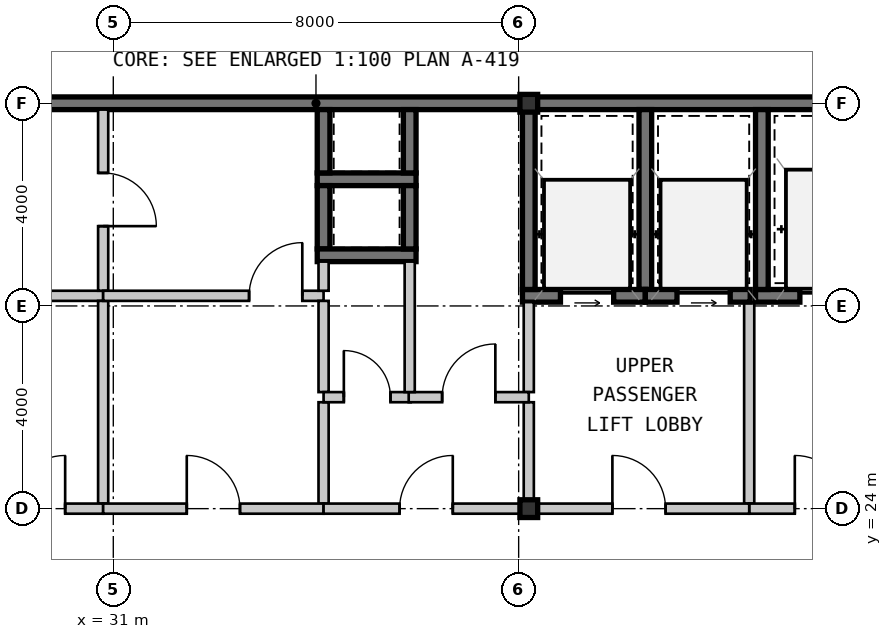
"""IFC4 building model, lengths in metres.
Left out: names, types, materials, properties, quantities, classifications, styles, units other than length and angle.
Written with IfcOpenShell. Run it as: python <this file> out.ifc"""

import sys

from ifc_helpers import new_model, si_unit, direction, frame, frame_2d, origin, origin_2d, place, context, subcontext, project, spatial, rectangle, hollow_rectangle, extrude, source, transform, mapped, element, fill, save


model = new_model("IFC4")
c1 = context("Model", 3, precision=1e-05, world=origin(), true_north=direction((0.0, 1.0)))
c2 = subcontext(c1, "Body", "Model", "MODEL_VIEW")
j1 = project(units=[si_unit("LENGTHUNIT", "METRE"), si_unit("PLANEANGLEUNIT", "RADIAN")], contexts=[c1])
p1 = place(None, origin())
s1 = spatial("IfcSite", under=j1, at=p1, CompositionType="ELEMENT")
p2 = place(p1, origin())
s2 = spatial("IfcBuilding", under=s1, at=p2, CompositionType="ELEMENT")
p3 = place(p2, frame((0.0, 0.0, 197.75)))
s3 = spatial("IfcBuildingStorey", under=s2, at=p3, CompositionType="ELEMENT", Elevation=197.75)
m1 = source(origin(), c2, "Body", "SweptSolid", [
    extrude(hollow_rectangle(XDim=0.35, YDim=0.35, WallThickness=0.016, at=origin_2d()), origin(), (0.0, 0.0, 1.0), 3.15),
])
for number, where, z_axis, x_axis in (
    (1, (39.2, 24.0, 0.0), (0.0, 0.0, 1.0), (1.0, 0.0, 0.0)),
    (2, (39.2, 32.0, 0.0), (0.0, 0.0, 1.0), (1.0, 0.0, 0.0)),
):
    element("IfcColumn", number, at=place(p3, frame(where, z_axis=z_axis, x_axis=x_axis)), inside=s3, PredefinedType="COLUMN", context=c2, shape_type="MappedRepresentation", body=[
        mapped(m1, transform((0.0, 0.0, 0.0), scale=1.0)),
    ])
m2 = source(origin(), c2, "Body", "SweptSolid", [
    extrude(rectangle(XDim=11.2, YDim=0.25, at=frame_2d((5.6, 0.0))), origin(), (0.0, 0.0, 1.0), 2.93),
])
p4 = place(p3, frame((28.0, 32.0, 0.0), z_axis=(0.0, 0.0, 1.0), x_axis=(1.0, 0.0, 0.0)))
e3 = element("IfcWall", 3, at=p4, inside=s3, PredefinedType="SHEAR", context=c2, shape_type="MappedRepresentation", body=[
    mapped(m2, transform((0.0, 0.0, 0.0), scale=1.0)),
])
m3 = source(origin(), c2, "Body", "SweptSolid", [
    extrude(rectangle(XDim=11.925, YDim=0.25, at=frame_2d((5.962, 0.0))), origin(), (0.0, 0.0, 1.0), 2.93),
])
p5 = place(p3, frame((39.2, 32.0, 0.0), z_axis=(0.0, 0.0, 1.0), x_axis=(1.0, 0.0, 0.0)))
e4 = element("IfcWall", 4, at=p5, inside=s3, PredefinedType="SHEAR", context=c2, shape_type="MappedRepresentation", body=[
    mapped(m3, transform((0.0, 0.0, 0.0), scale=1.0)),
])
m4 = source(origin(), c2, "Body", "SweptSolid", [
    extrude(rectangle(XDim=2.85, YDim=0.25, at=frame_2d((1.425, 0.0))), origin(), (0.0, 0.0, 1.0), 2.93),
])
p6 = place(p3, frame((43.675, 28.2, 0.0), z_axis=(0.0, 0.0, 1.0), x_axis=(1.0, 0.0, 0.0)))
e5 = element("IfcWall", 5, at=p6, inside=s3, PredefinedType="SHEAR", context=c2, shape_type="MappedRepresentation", body=[
    mapped(m4, transform((0.0, 0.0, 0.0), scale=1.0)),
])
m5 = source(origin(), c2, "Body", "SweptSolid", [
    extrude(rectangle(XDim=1.1, YDim=2.15, at=frame_2d((0.55, 1.075))), frame((0.0, 0.135, 0.0), z_axis=(0.0, -1.0, 0.0), x_axis=(1.0, 0.0, 0.0)), (0.0, 0.0, 1.0), 0.27),
])
p7 = place(p6, frame((0.875, 0.0, 0.0)))
e6 = element("IfcOpeningElement", 6, at=p7, cuts=e5, PredefinedType="OPENING", context=c2, shape_type="MappedRepresentation", body=[
    mapped(m5, transform((0.0, 0.0, 0.0), scale=1.0)),
])
m6 = source(origin(), c2, "Body", "SweptSolid", [
    extrude(rectangle(XDim=3.55, YDim=0.25, at=frame_2d((1.775, 0.0))), origin(), (0.0, 0.0, 1.0), 2.93),
])
p8 = place(p3, frame((43.8, 31.875, 0.0), z_axis=(0.0, 0.0, 1.0), x_axis=(0.0, -1.0, 0.0)))
e7 = element("IfcWall", 7, at=p8, inside=s3, PredefinedType="SHEAR", context=c2, shape_type="MappedRepresentation", body=[
    mapped(m6, transform((0.0, 0.0, 0.0), scale=1.0)),
])
m7 = source(origin(), c2, "Body", "SweptSolid", [
    extrude(rectangle(XDim=3.975, YDim=0.2, at=frame_2d((1.987, 0.0))), origin(), (0.0, 0.0, 1.0), 2.93),
])
p9 = place(p3, frame((43.55, 28.075, 0.0), z_axis=(0.0, 0.0, 1.0), x_axis=(0.0, -1.0, 0.0)))
e8 = element("IfcWall", 8, at=p9, inside=s3, PredefinedType="SOLIDWALL", context=c2, shape_type="MappedRepresentation", body=[
    mapped(m7, transform((0.0, 0.0, 0.0), scale=1.0)),
])
m8 = source(origin(), c2, "Body", "SweptSolid", [
    extrude(rectangle(XDim=2.725, YDim=0.2, at=frame_2d((1.362, 0.0))), origin(), (0.0, 0.0, 1.0), 2.397),
])
p10 = place(p3, frame((43.55, 24.0, 0.0), z_axis=(0.0, 0.0, 1.0), x_axis=(1.0, 0.0, 0.0)))
e9 = element("IfcWall", 9, at=p10, inside=s3, PredefinedType="SOLIDWALL", context=c2, shape_type="MappedRepresentation", body=[
    mapped(m8, transform((0.0, 0.0, 0.0), scale=1.0)),
])
m9 = source(origin(), c2, "Body", "SweptSolid", [
    extrude(rectangle(XDim=1.05, YDim=2.1, at=frame_2d((0.525, 1.05))), frame((0.0, 0.11, 0.0), z_axis=(0.0, -1.0, 0.0), x_axis=(1.0, 0.0, 0.0)), (0.0, 0.0, 1.0), 0.22),
])
p11 = place(p10, frame((0.9, 0.0, 0.0)))
e10 = element("IfcOpeningElement", 10, at=p11, cuts=e9, PredefinedType="OPENING", context=c2, shape_type="MappedRepresentation", body=[
    mapped(m9, transform((0.0, 0.0, 0.0), scale=1.0)),
])
m10 = source(origin(), c2, "Body", "SweptSolid", [
    extrude(rectangle(XDim=1.95, YDim=0.25, at=frame_2d((0.975, 0.0))), origin(), (0.0, 0.0, 1.0), 2.93),
])
p12 = place(p3, frame((35.025, 30.5, 0.0), z_axis=(0.0, 0.0, 1.0), x_axis=(1.0, 0.0, 0.0)))
e11 = element("IfcWall", 11, at=p12, inside=s3, PredefinedType="SHEAR", context=c2, shape_type="MappedRepresentation", body=[
    mapped(m10, transform((0.0, 0.0, 0.0), scale=1.0)),
])
m11 = source(origin(), c2, "Body", "SweptSolid", [
    extrude(rectangle(XDim=1.25, YDim=0.25, at=frame_2d((0.625, 0.0))), origin(), (0.0, 0.0, 1.0), 2.93),
])
for number, where, z_axis, x_axis in (
    (12, (35.15, 31.875, 0.0), (0.0, 0.0, 1.0), (0.0, -1.0, 0.0)),
    (13, (36.85, 30.625, 0.0), (0.0, 0.0, 1.0), (0.0, 1.0, 0.0)),
    (14, (35.15, 30.375, 0.0), (0.0, 0.0, 1.0), (0.0, -1.0, 0.0)),
):
    element("IfcWall", number, at=place(p3, frame(where, z_axis=z_axis, x_axis=x_axis)), inside=s3, PredefinedType="SHEAR", context=c2, shape_type="MappedRepresentation", body=[
        mapped(m11, transform((0.0, 0.0, 0.0), scale=1.0)),
    ])
p13 = place(p3, frame((35.025, 29.0, 0.0), z_axis=(0.0, 0.0, 1.0), x_axis=(1.0, 0.0, 0.0)))
e15 = element("IfcWall", 15, at=p13, inside=s3, PredefinedType="SHEAR", context=c2, shape_type="MappedRepresentation", body=[
    mapped(m10, transform((0.0, 0.0, 0.0), scale=1.0)),
])
p14 = place(p3, frame((36.85, 29.125, 0.0), z_axis=(0.0, 0.0, 1.0), x_axis=(0.0, 1.0, 0.0)))
e16 = element("IfcWall", 16, at=p14, inside=s3, PredefinedType="SHEAR", context=c2, shape_type="MappedRepresentation", body=[
    mapped(m11, transform((0.0, 0.0, 0.0), scale=1.0)),
])
p15 = place(p3, frame((41.5, 28.325, 0.0), z_axis=(0.0, 0.0, 1.0), x_axis=(0.0, 1.0, 0.0)))
e17 = element("IfcWall", 17, at=p15, inside=s3, PredefinedType="SHEAR", context=c2, shape_type="MappedRepresentation", body=[
    mapped(m6, transform((0.0, 0.0, 0.0), scale=1.0)),
])
m12 = source(origin(), c2, "Body", "SweptSolid", [
    extrude(rectangle(XDim=2.425, YDim=0.25, at=frame_2d((1.212, 0.0))), origin(), (0.0, 0.0, 1.0), 2.93),
])
p16 = place(p3, frame((39.075, 28.2, 0.0), z_axis=(0.0, 0.0, 1.0), x_axis=(1.0, 0.0, 0.0)))
e18 = element("IfcWall", 18, at=p16, inside=s3, PredefinedType="SHEAR", context=c2, shape_type="MappedRepresentation", body=[
    mapped(m12, transform((0.0, 0.0, 0.0), scale=1.0)),
])
m13 = source(origin(), c2, "Body", "SweptSolid", [
    extrude(rectangle(XDim=1.05, YDim=2.15, at=frame_2d((0.525, 1.075))), frame((0.0, 0.135, 0.0), z_axis=(0.0, -1.0, 0.0), x_axis=(1.0, 0.0, 0.0)), (0.0, 0.0, 1.0), 0.27),
])
p17 = place(p16, frame((0.75, 0.0, 0.0)))
e19 = element("IfcOpeningElement", 19, at=p17, cuts=e18, PredefinedType="OPENING", context=c2, shape_type="MappedRepresentation", body=[
    mapped(m13, transform((0.0, 0.0, 0.0), scale=1.0)),
])
p18 = place(p3, frame((39.2, 31.875, 0.0), z_axis=(0.0, 0.0, 1.0), x_axis=(0.0, -1.0, 0.0)))
e20 = element("IfcWall", 20, at=p18, inside=s3, PredefinedType="SHEAR", context=c2, shape_type="MappedRepresentation", body=[
    mapped(m6, transform((0.0, 0.0, 0.0), scale=1.0)),
])
m14 = source(origin(), c2, "Body", "SweptSolid", [
    extrude(rectangle(XDim=2.07, YDim=0.25, at=frame_2d((1.035, 0.0))), origin(), (0.0, 0.0, 1.0), 2.93),
])
p19 = place(p3, frame((41.5, 28.2, 0.0), z_axis=(0.0, 0.0, 1.0), x_axis=(1.0, 0.0, 0.0)))
e21 = element("IfcWall", 21, at=p19, inside=s3, PredefinedType="SHEAR", context=c2, shape_type="MappedRepresentation", body=[
    mapped(m14, transform((0.0, 0.0, 0.0), scale=1.0)),
])
p20 = place(p19, frame((0.625, 0.0, 0.0)))
e22 = element("IfcOpeningElement", 22, at=p20, cuts=e21, PredefinedType="OPENING", context=c2, shape_type="MappedRepresentation", body=[
    mapped(m13, transform((0.0, 0.0, 0.0), scale=1.0)),
])
m15 = source(origin(), c2, "Body", "SweptSolid", [
    extrude(rectangle(XDim=2.0, YDim=0.2, at=frame_2d((1.0, 0.0))), origin(), (0.0, 0.0, 1.0), 2.47),
])
p21 = place(p3, frame((39.2, 24.1, 0.0), z_axis=(0.0, 0.0, 1.0), x_axis=(0.0, 1.0, 0.0)))
e23 = element("IfcWall", 23, at=p21, inside=s3, PredefinedType="SOLIDWALL", context=c2, shape_type="MappedRepresentation", body=[
    mapped(m15, transform((0.0, 0.0, 0.0), scale=1.0)),
])
m16 = source(origin(), c2, "Body", "SweptSolid", [
    extrude(rectangle(XDim=1.775, YDim=0.2, at=frame_2d((0.887, 0.0))), origin(), (0.0, 0.0, 1.0), 2.47),
])
p22 = place(p3, frame((39.2, 26.3, 0.0), z_axis=(0.0, 0.0, 1.0), x_axis=(0.0, 1.0, 0.0)))
e24 = element("IfcWall", 24, at=p22, inside=s3, PredefinedType="SOLIDWALL", context=c2, shape_type="MappedRepresentation", body=[
    mapped(m16, transform((0.0, 0.0, 0.0), scale=1.0)),
])
m17 = source(origin(), c2, "Body", "SweptSolid", [
    extrude(rectangle(XDim=4.35, YDim=0.2, at=frame_2d((2.175, 0.0))), origin(), (0.0, 0.0, 1.0), 2.397),
])
p23 = place(p3, frame((43.55, 24.0, 0.0), z_axis=(0.0, 0.0, 1.0), x_axis=(-1.0, 0.0, 0.0)))
e25 = element("IfcWall", 25, at=p23, inside=s3, PredefinedType="SOLIDWALL", context=c2, shape_type="MappedRepresentation", body=[
    mapped(m17, transform((0.0, 0.0, 0.0), scale=1.0)),
])
p24 = place(p23, frame((1.65, 0.0, 0.0)))
e26 = element("IfcOpeningElement", 26, at=p24, cuts=e25, PredefinedType="OPENING", context=c2, shape_type="MappedRepresentation", body=[
    mapped(m9, transform((0.0, 0.0, 0.0), scale=1.0)),
])
m18 = source(origin(), c2, "Body", "SweptSolid", [
    extrude(rectangle(XDim=4.35, YDim=0.2, at=frame_2d((2.175, 0.0))), origin(), (0.0, 0.0, 1.0), 2.93),
])
p25 = place(p3, frame((26.45, 28.2, 0.0), z_axis=(0.0, 0.0, 1.0), x_axis=(1.0, 0.0, 0.0)))
e27 = element("IfcWall", 27, at=p25, inside=s3, PredefinedType="SOLIDWALL", context=c2, shape_type="MappedRepresentation", body=[
    mapped(m18, transform((0.0, 0.0, 0.0), scale=1.0)),
])
m19 = source(origin(), c2, "Body", "SweptSolid", [
    extrude(rectangle(XDim=4.0, YDim=0.2, at=frame_2d((2.0, 0.0))), origin(), (0.0, 0.0, 1.0), 2.93),
])
p26 = place(p3, frame((30.8, 28.1, 0.0), z_axis=(0.0, 0.0, 1.0), x_axis=(0.0, -1.0, 0.0)))
e28 = element("IfcWall", 28, at=p26, inside=s3, PredefinedType="SOLIDWALL", context=c2, shape_type="MappedRepresentation", body=[
    mapped(m19, transform((0.0, 0.0, 0.0), scale=1.0)),
])
m20 = source(origin(), c2, "Body", "SweptSolid", [
    extrude(rectangle(XDim=4.35, YDim=0.2, at=frame_2d((2.175, 0.0))), origin(), (0.0, 0.0, 1.0), 2.47),
])
p27 = place(p3, frame((30.8, 24.0, 0.0), z_axis=(0.0, 0.0, 1.0), x_axis=(-1.0, 0.0, 0.0)))
e29 = element("IfcWall", 29, at=p27, inside=s3, PredefinedType="SOLIDWALL", context=c2, shape_type="MappedRepresentation", body=[
    mapped(m20, transform((0.0, 0.0, 0.0), scale=1.0)),
])
p28 = place(p27, frame((0.75, 0.0, 0.0)))
e30 = element("IfcOpeningElement", 30, at=p28, cuts=e29, PredefinedType="OPENING", context=c2, shape_type="MappedRepresentation", body=[
    mapped(m9, transform((0.0, 0.0, 0.0), scale=1.0)),
])
m21 = source(origin(), c2, "Body", "SweptSolid", [
    extrude(rectangle(XDim=3.575, YDim=0.2, at=frame_2d((1.788, 0.0))), origin(), (0.0, 0.0, 1.0), 2.93),
])
p29 = place(p3, frame((30.8, 31.875, 0.0), z_axis=(0.0, 0.0, 1.0), x_axis=(0.0, -1.0, 0.0)))
e31 = element("IfcWall", 31, at=p29, inside=s3, PredefinedType="SOLIDWALL", context=c2, shape_type="MappedRepresentation", body=[
    mapped(m21, transform((0.0, 0.0, 0.0), scale=1.0)),
])
p30 = place(p29, frame((1.25, 0.0, 0.0)))
e32 = element("IfcOpeningElement", 32, at=p30, cuts=e31, PredefinedType="OPENING", context=c2, shape_type="MappedRepresentation", body=[
    mapped(m9, transform((0.0, 0.0, 0.0), scale=1.0)),
])
m22 = source(origin(), c2, "Body", "SweptSolid", [
    extrude(rectangle(XDim=4.35, YDim=0.2, at=frame_2d((2.175, 0.0))), origin(), (0.0, 0.0, 1.0), 2.93),
])
p31 = place(p3, frame((30.8, 28.2, 0.0), z_axis=(0.0, 0.0, 1.0), x_axis=(1.0, 0.0, 0.0)))
e33 = element("IfcWall", 33, at=p31, inside=s3, PredefinedType="SOLIDWALL", context=c2, shape_type="MappedRepresentation", body=[
    mapped(m22, transform((0.0, 0.0, 0.0), scale=1.0)),
])
p32 = place(p31, frame((2.88, 0.0, 0.0)))
e34 = element("IfcOpeningElement", 34, at=p32, cuts=e33, PredefinedType="OPENING", context=c2, shape_type="MappedRepresentation", body=[
    mapped(m9, transform((0.0, 0.0, 0.0), scale=1.0)),
])
m23 = source(origin(), c2, "Body", "SweptSolid", [
    extrude(rectangle(XDim=2.0, YDim=0.2, at=frame_2d((1.0, 0.0))), origin(), (0.0, 0.0, 1.0), 2.93),
])
p33 = place(p3, frame((35.15, 26.1, 0.0), z_axis=(0.0, 0.0, 1.0), x_axis=(0.0, -1.0, 0.0)))
e35 = element("IfcWall", 35, at=p33, inside=s3, PredefinedType="SOLIDWALL", context=c2, shape_type="MappedRepresentation", body=[
    mapped(m23, transform((0.0, 0.0, 0.0), scale=1.0)),
])
m24 = source(origin(), c2, "Body", "SweptSolid", [
    extrude(rectangle(XDim=1.8, YDim=0.2, at=frame_2d((0.9, 0.0))), origin(), (0.0, 0.0, 1.0), 2.93),
])
p34 = place(p3, frame((35.15, 28.1, 0.0), z_axis=(0.0, 0.0, 1.0), x_axis=(0.0, -1.0, 0.0)))
e36 = element("IfcWall", 36, at=p34, inside=s3, PredefinedType="SOLIDWALL", context=c2, shape_type="MappedRepresentation", body=[
    mapped(m24, transform((0.0, 0.0, 0.0), scale=1.0)),
])
m25 = source(origin(), c2, "Body", "SweptSolid", [
    extrude(rectangle(XDim=4.35, YDim=0.2, at=frame_2d((2.175, 0.0))), origin(), (0.0, 0.0, 1.0), 2.47),
])
p35 = place(p3, frame((35.15, 24.0, 0.0), z_axis=(0.0, 0.0, 1.0), x_axis=(-1.0, 0.0, 0.0)))
e37 = element("IfcWall", 37, at=p35, inside=s3, PredefinedType="SOLIDWALL", context=c2, shape_type="MappedRepresentation", body=[
    mapped(m25, transform((0.0, 0.0, 0.0), scale=1.0)),
])
p36 = place(p35, frame((1.65, 0.0, 0.0)))
e38 = element("IfcOpeningElement", 38, at=p36, cuts=e37, PredefinedType="OPENING", context=c2, shape_type="MappedRepresentation", body=[
    mapped(m9, transform((0.0, 0.0, 0.0), scale=1.0)),
])
m26 = source(origin(), c2, "Body", "SweptSolid", [
    extrude(rectangle(XDim=0.575, YDim=0.2, at=frame_2d((0.288, 0.0))), origin(), (0.0, 0.0, 1.0), 2.93),
])
p37 = place(p3, frame((35.15, 28.875, 0.0), z_axis=(0.0, 0.0, 1.0), x_axis=(0.0, -1.0, 0.0)))
e39 = element("IfcWall", 39, at=p37, inside=s3, PredefinedType="SOLIDWALL", context=c2, shape_type="MappedRepresentation", body=[
    mapped(m26, transform((0.0, 0.0, 0.0), scale=1.0)),
])
m27 = source(origin(), c2, "Body", "SweptSolid", [
    extrude(rectangle(XDim=1.72, YDim=0.2, at=frame_2d((0.86, 0.0))), origin(), (0.0, 0.0, 1.0), 2.93),
])
p38 = place(p3, frame((35.15, 26.2, 0.0), z_axis=(0.0, 0.0, 1.0), x_axis=(1.0, 0.0, 0.0)))
e40 = element("IfcWall", 40, at=p38, inside=s3, PredefinedType="SOLIDWALL", context=c2, shape_type="MappedRepresentation", body=[
    mapped(m27, transform((0.0, 0.0, 0.0), scale=1.0)),
])
m28 = source(origin(), c2, "Body", "SweptSolid", [
    extrude(rectangle(XDim=0.92, YDim=2.1, at=frame_2d((0.46, 1.05))), frame((0.0, 0.11, 0.0), z_axis=(0.0, -1.0, 0.0), x_axis=(1.0, 0.0, 0.0)), (0.0, 0.0, 1.0), 0.22),
])
p39 = place(p38, frame((0.4, 0.0, 0.0)))
e41 = element("IfcOpeningElement", 41, at=p39, cuts=e40, PredefinedType="OPENING", context=c2, shape_type="MappedRepresentation", body=[
    mapped(m28, transform((0.0, 0.0, 0.0), scale=1.0)),
])
m29 = source(origin(), c2, "Body", "SweptSolid", [
    extrude(rectangle(XDim=2.37, YDim=0.2, at=frame_2d((1.185, 0.0))), origin(), (0.0, 0.0, 1.0), 2.93),
])
p40 = place(p3, frame((36.83, 26.2, 0.0), z_axis=(0.0, 0.0, 1.0), x_axis=(1.0, 0.0, 0.0)))
e42 = element("IfcWall", 42, at=p40, inside=s3, PredefinedType="SOLIDWALL", context=c2, shape_type="MappedRepresentation", body=[
    mapped(m29, transform((0.0, 0.0, 0.0), scale=1.0)),
])
p41 = place(p40, frame((0.66, 0.0, 0.0)))
e43 = element("IfcOpeningElement", 43, at=p41, cuts=e42, PredefinedType="OPENING", context=c2, shape_type="MappedRepresentation", body=[
    mapped(m9, transform((0.0, 0.0, 0.0), scale=1.0)),
])
m30 = source(origin(), c2, "Body", "SweptSolid", [
    extrude(rectangle(XDim=4.05, YDim=0.2, at=frame_2d((2.025, 0.0))), origin(), (0.0, 0.0, 1.0), 2.47),
])
p42 = place(p3, frame((39.2, 24.0, 0.0), z_axis=(0.0, 0.0, 1.0), x_axis=(-1.0, 0.0, 0.0)))
e44 = element("IfcWall", 44, at=p42, inside=s3, PredefinedType="SOLIDWALL", context=c2, shape_type="MappedRepresentation", body=[
    mapped(m30, transform((0.0, 0.0, 0.0), scale=1.0)),
])
p43 = place(p42, frame((1.5, 0.0, 0.0)))
e45 = element("IfcOpeningElement", 45, at=p43, cuts=e44, PredefinedType="OPENING", context=c2, shape_type="MappedRepresentation", body=[
    mapped(m9, transform((0.0, 0.0, 0.0), scale=1.0)),
])
m31 = source(origin(), c2, "Body", "SweptSolid", [
    extrude(rectangle(XDim=2.575, YDim=0.2, at=frame_2d((1.288, 0.0))), origin(), (0.0, 0.0, 1.0), 2.93),
])
p44 = place(p3, frame((36.85, 28.875, 0.0), z_axis=(0.0, 0.0, 1.0), x_axis=(0.0, -1.0, 0.0)))
e46 = element("IfcWall", 46, at=p44, inside=s3, PredefinedType="SOLIDWALL", context=c2, shape_type="MappedRepresentation", body=[
    mapped(m31, transform((0.0, 0.0, 0.0), scale=1.0)),
])
m32 = source(origin(), c2, "Body", "SweptSolid", [
    extrude(rectangle(XDim=1.1, YDim=2.15, at=frame_2d((0.55, 1.075))), frame((0.0, 0.025, 0.0), z_axis=(0.0, -1.0, 0.0), x_axis=(1.0, 0.0, 0.0)), (0.0, 0.0, 1.0), 0.05),
])
p45 = place(p7, origin())
e47 = element("IfcDoor", 47, at=p45, inside=s3, OperationType="SLIDING_TO_LEFT", PredefinedType="DOOR", context=c2, shape_type="MappedRepresentation", body=[
    mapped(m32, transform((0.0, 0.0, 0.0), scale=1.0)),
])
fill(e6, e47)
m33 = source(origin(), c2, "Body", "SweptSolid", [
    extrude(rectangle(XDim=1.05, YDim=2.1, at=frame_2d((0.525, 1.05))), frame((0.0, 0.025, 0.0), z_axis=(0.0, -1.0, 0.0), x_axis=(1.0, 0.0, 0.0)), (0.0, 0.0, 1.0), 0.05),
])
p46 = place(p11, origin())
e48 = element("IfcDoor", 48, at=p46, inside=s3, OperationType="SINGLE_SWING_LEFT", PredefinedType="DOOR", context=c2, shape_type="MappedRepresentation", body=[
    mapped(m33, transform((0.0, 0.0, 0.0), scale=1.0)),
])
fill(e10, e48)
m34 = source(origin(), c2, "Body", "SweptSolid", [
    extrude(rectangle(XDim=1.05, YDim=2.15, at=frame_2d((0.525, 1.075))), frame((0.0, 0.025, 0.0), z_axis=(0.0, -1.0, 0.0), x_axis=(1.0, 0.0, 0.0)), (0.0, 0.0, 1.0), 0.05),
])
p47 = place(p17, origin())
e49 = element("IfcDoor", 49, at=p47, inside=s3, OperationType="SLIDING_TO_LEFT", PredefinedType="DOOR", context=c2, shape_type="MappedRepresentation", body=[
    mapped(m34, transform((0.0, 0.0, 0.0), scale=1.0)),
])
fill(e19, e49)
p48 = place(p20, origin())
e50 = element("IfcDoor", 50, at=p48, inside=s3, OperationType="SLIDING_TO_LEFT", PredefinedType="DOOR", context=c2, shape_type="MappedRepresentation", body=[
    mapped(m34, transform((0.0, 0.0, 0.0), scale=1.0)),
])
fill(e22, e50)
p49 = place(p24, frame((1.05, 0.0, 0.0), z_axis=(0.0, 0.0, 1.0), x_axis=(-1.0, 0.0, 0.0)))
e51 = element("IfcDoor", 51, at=p49, inside=s3, OperationType="SINGLE_SWING_LEFT", PredefinedType="DOOR", context=c2, shape_type="MappedRepresentation", body=[
    mapped(m33, transform((0.0, 0.0, 0.0), scale=1.0)),
])
fill(e26, e51)
p50 = place(p28, frame((1.05, 0.0, 0.0), z_axis=(0.0, 0.0, 1.0), x_axis=(-1.0, 0.0, 0.0)))
e52 = element("IfcDoor", 52, at=p50, inside=s3, OperationType="SINGLE_SWING_RIGHT", PredefinedType="DOOR", context=c2, shape_type="MappedRepresentation", body=[
    mapped(m33, transform((0.0, 0.0, 0.0), scale=1.0)),
])
fill(e30, e52)
p51 = place(p30, origin())
e53 = element("IfcDoor", 53, at=p51, inside=s3, OperationType="SINGLE_SWING_RIGHT", PredefinedType="DOOR", context=c2, shape_type="MappedRepresentation", body=[
    mapped(m33, transform((0.0, 0.0, 0.0), scale=1.0)),
])
fill(e32, e53)
p52 = place(p32, origin())
e54 = element("IfcDoor", 54, at=p52, inside=s3, OperationType="SINGLE_SWING_RIGHT", PredefinedType="DOOR", context=c2, shape_type="MappedRepresentation", body=[
    mapped(m33, transform((0.0, 0.0, 0.0), scale=1.0)),
])
fill(e34, e54)
p53 = place(p36, frame((1.05, 0.0, 0.0), z_axis=(0.0, 0.0, 1.0), x_axis=(-1.0, 0.0, 0.0)))
e55 = element("IfcDoor", 55, at=p53, inside=s3, OperationType="SINGLE_SWING_LEFT", PredefinedType="DOOR", context=c2, shape_type="MappedRepresentation", body=[
    mapped(m33, transform((0.0, 0.0, 0.0), scale=1.0)),
])
fill(e38, e55)
m35 = source(origin(), c2, "Body", "SweptSolid", [
    extrude(rectangle(XDim=0.92, YDim=2.1, at=frame_2d((0.46, 1.05))), frame((0.0, 0.025, 0.0), z_axis=(0.0, -1.0, 0.0), x_axis=(1.0, 0.0, 0.0)), (0.0, 0.0, 1.0), 0.05),
])
p54 = place(p39, origin())
e56 = element("IfcDoor", 56, at=p54, inside=s3, OperationType="SINGLE_SWING_LEFT", PredefinedType="DOOR", context=c2, shape_type="MappedRepresentation", body=[
    mapped(m35, transform((0.0, 0.0, 0.0), scale=1.0)),
])
fill(e41, e56)
p55 = place(p41, origin())
e57 = element("IfcDoor", 57, at=p55, inside=s3, OperationType="SINGLE_SWING_RIGHT", PredefinedType="DOOR", context=c2, shape_type="MappedRepresentation", body=[
    mapped(m33, transform((0.0, 0.0, 0.0), scale=1.0)),
])
fill(e43, e57)
p56 = place(p43, frame((1.05, 0.0, 0.0), z_axis=(0.0, 0.0, 1.0), x_axis=(-1.0, 0.0, 0.0)))
e58 = element("IfcDoor", 58, at=p56, inside=s3, OperationType="SINGLE_SWING_RIGHT", PredefinedType="DOOR", context=c2, shape_type="MappedRepresentation", body=[
    mapped(m33, transform((0.0, 0.0, 0.0), scale=1.0)),
])
fill(e45, e58)
save(model, sys.argv[1])
